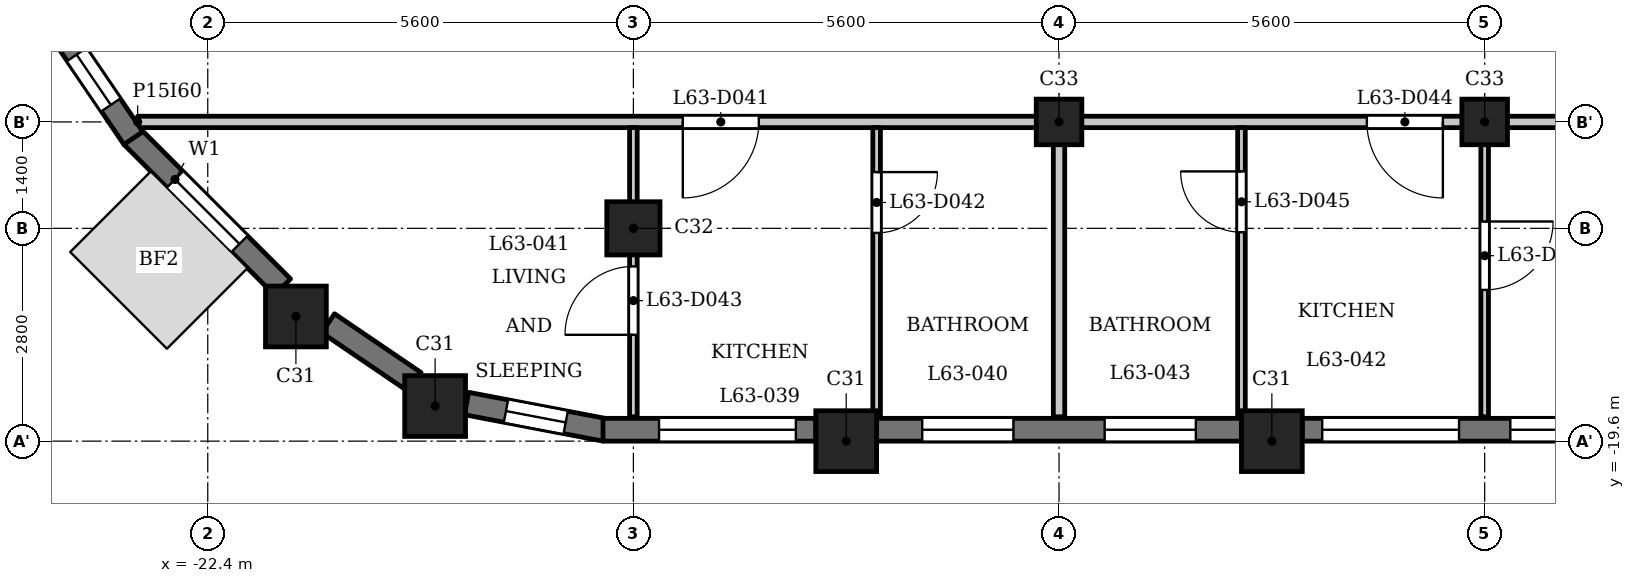
"""IFC4 building model, lengths in metres.
Left out: names, types, materials, properties, quantities, classifications, styles, units other than length and angle.
Written with IfcOpenShell. Run it as: python <this file> out.ifc"""

import sys

from ifc_helpers import new_model, si_unit, direction, frame, frame_2d, origin, origin_2d, place, context, subcontext, project, spatial, rectangle, extrude, element, fill, save


model = new_model("IFC4")
c1 = context("Model", 3, precision=1e-05, world=origin(), true_north=direction((0.0, 1.0)))
c2 = subcontext(c1, "Body", "Model", "MODEL_VIEW")
j1 = project(units=[si_unit("LENGTHUNIT", "METRE"), si_unit("PLANEANGLEUNIT", "RADIAN")], contexts=[c1])
p1 = place(None, origin())
s1 = spatial("IfcSite", under=j1, at=p1, CompositionType="ELEMENT")
p2 = place(p1, origin())
s2 = spatial("IfcBuilding", under=s1, at=p2, CompositionType="ELEMENT")
p3 = place(p2, frame((0.0, 0.0, 245.2)))
s3 = spatial("IfcBuildingStorey", under=s2, at=p3, CompositionType="ELEMENT", Elevation=245.2)
for number, where, z_axis, x_axis in (
    (1, (-19.409, -19.138, 0.0), (0.0, 0.0, 1.0), (1.0, 0.0, 0.0)),
    (2, (-14.0, -19.6, 0.0), (0.0, 0.0, 1.0), (1.0, 0.0, 0.0)),
    (3, (-8.4, -19.6, 0.0), (0.0, 0.0, 1.0), (1.0, 0.0, 0.0)),
    (4, (-21.24, -17.96, 0.0), (0.0, 0.0, 1.0), (1.0, 0.0, 0.0)),
):
    element("IfcColumn", number, at=place(p3, frame(where, z_axis=z_axis, x_axis=x_axis)), inside=s3, PredefinedType="COLUMN", context=c2, shape_type="SweptSolid", body=[
        extrude(rectangle(XDim=0.8, YDim=0.8, at=origin_2d()), origin(), (0.0, 0.0, 1.0), 3.5),
    ])
p4 = place(p3, frame((-16.8, -16.8, 0.0), z_axis=(0.0, 0.0, 1.0), x_axis=(1.0, 0.0, 0.0)))
e5 = element("IfcColumn", 5, at=p4, inside=s3, PredefinedType="COLUMN", context=c2, shape_type="SweptSolid", body=[
    extrude(rectangle(XDim=0.7, YDim=0.7, at=origin_2d()), origin(), (0.0, 0.0, 1.0), 3.5),
])
for number, where, z_axis, x_axis in (
    (6, (-11.2, -15.4, 0.0), (0.0, 0.0, 1.0), (1.0, 0.0, 0.0)),
    (7, (-5.6, -15.4, 0.0), (0.0, 0.0, 1.0), (1.0, 0.0, 0.0)),
):
    element("IfcColumn", number, at=place(p3, frame(where, z_axis=z_axis, x_axis=x_axis)), inside=s3, PredefinedType="COLUMN", context=c2, shape_type="SweptSolid", body=[
        extrude(rectangle(XDim=0.6, YDim=0.6, at=origin_2d()), origin(), (0.0, 0.0, 1.0), 3.5),
    ])
p5 = place(p3, frame((-23.397, -15.591, 0.0), z_axis=(0.0, 0.0, 1.0), x_axis=(0.707150377276, -0.707063182409, 0.0)))
e8 = element("IfcWall", 8, at=p5, inside=s3, PredefinedType="SOLIDWALL", context=c2, shape_type="SweptSolid", body=[
    extrude(rectangle(XDim=2.8, YDim=0.3, at=frame_2d((1.4, 0.0))), origin(), (0.0, 0.0, 1.0), 2.55),
])
p6 = place(p5, frame((0.8, 0.0, 0.6)))
e9 = element("IfcOpeningElement", 9, at=p6, cuts=e8, PredefinedType="OPENING", context=c2, shape_type="SweptSolid", body=[
    extrude(rectangle(XDim=1.2, YDim=1.55, at=frame_2d((0.6, 0.775))), frame((0.0, 0.16, 0.0), z_axis=(0.0, -1.0, 0.0), x_axis=(1.0, 0.0, 0.0)), (0.0, 0.0, 1.0), 0.32),
])
p7 = place(p3, frame((-20.817, -18.048, 0.0), z_axis=(0.0, 0.0, 1.0), x_axis=(0.827025410886, -0.562164539747, 0.0)))
e10 = element("IfcWall", 10, at=p7, inside=s3, PredefinedType="SOLIDWALL", context=c2, shape_type="SweptSolid", body=[
    extrude(rectangle(XDim=1.377, YDim=0.3, at=frame_2d((0.688, 0.0))), origin(), (0.0, 0.0, 1.0), 2.55),
])
p8 = place(p3, frame((-18.995, -19.105, 0.0), z_axis=(0.0, 0.0, 1.0), x_axis=(0.982301706131, -0.187305520826, 0.0)))
e11 = element("IfcWall", 11, at=p8, inside=s3, PredefinedType="SOLIDWALL", context=c2, shape_type="SweptSolid", body=[
    extrude(rectangle(XDim=1.856, YDim=0.3, at=frame_2d((0.928, 0.0))), origin(), (0.0, 0.0, 1.0), 2.55),
])
p9 = place(p8, frame((0.528, 0.0, 0.6)))
e12 = element("IfcOpeningElement", 12, at=p9, cuts=e11, PredefinedType="OPENING", context=c2, shape_type="SweptSolid", body=[
    extrude(rectangle(XDim=0.8, YDim=1.55, at=frame_2d((0.4, 0.775))), frame((0.0, 0.16, 0.0), z_axis=(0.0, -1.0, 0.0), x_axis=(1.0, 0.0, 0.0)), (0.0, 0.0, 1.0), 0.32),
])
p10 = place(p3, frame((-17.2, -19.45, 0.0), z_axis=(0.0, 0.0, 1.0), x_axis=(1.0, 0.0, 0.0)))
e13 = element("IfcWall", 13, at=p10, inside=s3, PredefinedType="SOLIDWALL", context=c2, shape_type="SweptSolid", body=[
    extrude(rectangle(XDim=2.8, YDim=0.3, at=frame_2d((1.4, 0.0))), origin(), (0.0, 0.0, 1.0), 2.55),
])
p11 = place(p10, frame((0.738, 0.0, 0.9)))
e14 = element("IfcOpeningElement", 14, at=p11, cuts=e13, PredefinedType="OPENING", context=c2, shape_type="SweptSolid", body=[
    extrude(rectangle(XDim=1.8, YDim=1.25, at=frame_2d((0.9, 0.625))), frame((0.0, 0.16, 0.0), z_axis=(0.0, -1.0, 0.0), x_axis=(1.0, 0.0, 0.0)), (0.0, 0.0, 1.0), 0.32),
])
p12 = place(p3, frame((-13.6, -19.45, 0.0), z_axis=(0.0, 0.0, 1.0), x_axis=(1.0, 0.0, 0.0)))
e15 = element("IfcWall", 15, at=p12, inside=s3, PredefinedType="SOLIDWALL", context=c2, shape_type="SweptSolid", body=[
    extrude(rectangle(XDim=4.8, YDim=0.3, at=frame_2d((2.4, 0.0))), origin(), (0.0, 0.0, 1.0), 2.55),
])
p13 = place(p12, frame((0.6, 0.0, 0.6)))
e16 = element("IfcOpeningElement", 16, at=p13, cuts=e15, PredefinedType="OPENING", context=c2, shape_type="SweptSolid", body=[
    extrude(rectangle(XDim=1.2, YDim=1.55, at=frame_2d((0.6, 0.775))), frame((0.0, 0.16, 0.0), z_axis=(0.0, -1.0, 0.0), x_axis=(1.0, 0.0, 0.0)), (0.0, 0.0, 1.0), 0.32),
])
p14 = place(p12, frame((3.0, 0.0, 0.6)))
e17 = element("IfcOpeningElement", 17, at=p14, cuts=e15, PredefinedType="OPENING", context=c2, shape_type="SweptSolid", body=[
    extrude(rectangle(XDim=1.2, YDim=1.55, at=frame_2d((0.6, 0.775))), frame((0.0, 0.16, 0.0), z_axis=(0.0, -1.0, 0.0), x_axis=(1.0, 0.0, 0.0)), (0.0, 0.0, 1.0), 0.32),
])
p15 = place(p3, frame((-8.0, -19.45, 0.0), z_axis=(0.0, 0.0, 1.0), x_axis=(1.0, 0.0, 0.0)))
e18 = element("IfcWall", 18, at=p15, inside=s3, PredefinedType="SOLIDWALL", context=c2, shape_type="SweptSolid", body=[
    extrude(rectangle(XDim=4.8, YDim=0.3, at=frame_2d((2.4, 0.0))), origin(), (0.0, 0.0, 1.0), 2.55),
])
p16 = place(p15, frame((0.262, 0.0, 0.9)))
e19 = element("IfcOpeningElement", 19, at=p16, cuts=e18, PredefinedType="OPENING", context=c2, shape_type="SweptSolid", body=[
    extrude(rectangle(XDim=1.8, YDim=1.25, at=frame_2d((0.9, 0.625))), frame((0.0, 0.16, 0.0), z_axis=(0.0, -1.0, 0.0), x_axis=(1.0, 0.0, 0.0)), (0.0, 0.0, 1.0), 0.32),
])
p17 = place(p15, frame((2.738, 0.0, 0.9)))
e20 = element("IfcOpeningElement", 20, at=p17, cuts=e18, PredefinedType="OPENING", context=c2, shape_type="SweptSolid", body=[
    extrude(rectangle(XDim=1.8, YDim=1.25, at=frame_2d((0.9, 0.625))), frame((0.0, 0.16, 0.0), z_axis=(0.0, -1.0, 0.0), x_axis=(1.0, 0.0, 0.0)), (0.0, 0.0, 1.0), 0.32),
])
p18 = place(p3, frame((-24.422, -14.078, 0.0), z_axis=(0.0, 0.0, 1.0), x_axis=(0.562054549384, -0.827100165347, 0.0)))
e21 = element("IfcWall", 21, at=p18, inside=s3, PredefinedType="SOLIDWALL", context=c2, shape_type="SweptSolid", body=[
    extrude(rectangle(XDim=1.856, YDim=0.3, at=frame_2d((0.928, 0.0))), origin(), (0.0, 0.0, 1.0), 2.55),
])
p19 = place(p18, frame((0.528, 0.0, 0.6)))
e22 = element("IfcOpeningElement", 22, at=p19, cuts=e21, PredefinedType="OPENING", context=c2, shape_type="SweptSolid", body=[
    extrude(rectangle(XDim=0.8, YDim=1.55, at=frame_2d((0.4, 0.775))), frame((0.0, 0.16, 0.0), z_axis=(0.0, -1.0, 0.0), x_axis=(1.0, 0.0, 0.0)), (0.0, 0.0, 1.0), 0.32),
])
p20 = place(p3, frame((-23.322, -15.4, 0.0), z_axis=(0.0, 0.0, 1.0), x_axis=(1.0, 0.0, 0.0)))
e23 = element("IfcWall", 23, at=p20, inside=s3, PredefinedType="PARTITIONING", context=c2, shape_type="SweptSolid", body=[
    extrude(rectangle(XDim=46.872, YDim=0.15, at=frame_2d((23.436, 0.0))), origin(), (0.0, 0.0, 1.0), 3.2),
])
p21 = place(p20, frame((7.172, 0.0, 0.0)))
e24 = element("IfcOpeningElement", 24, at=p21, cuts=e23, PredefinedType="OPENING", context=c2, shape_type="SweptSolid", body=[
    extrude(rectangle(XDim=1.0, YDim=2.1, at=frame_2d((0.5, 1.05))), frame((0.0, 0.085, 0.0), z_axis=(0.0, -1.0, 0.0), x_axis=(1.0, 0.0, 0.0)), (0.0, 0.0, 1.0), 0.17),
])
p22 = place(p20, frame((16.172, 0.0, 0.0)))
e25 = element("IfcOpeningElement", 25, at=p22, cuts=e23, PredefinedType="OPENING", context=c2, shape_type="SweptSolid", body=[
    extrude(rectangle(XDim=1.0, YDim=2.1, at=frame_2d((0.5, 1.05))), frame((0.0, 0.085, 0.0), z_axis=(0.0, -1.0, 0.0), x_axis=(1.0, 0.0, 0.0)), (0.0, 0.0, 1.0), 0.17),
])
p23 = place(p20, frame((26.372, 0.0, 0.0)))
e26 = element("IfcOpeningElement", 26, at=p23, cuts=e23, PredefinedType="OPENING", context=c2, shape_type="SweptSolid", body=[
    extrude(rectangle(XDim=1.0, YDim=2.1, at=frame_2d((0.5, 1.05))), frame((0.0, 0.085, 0.0), z_axis=(0.0, -1.0, 0.0), x_axis=(1.0, 0.0, 0.0)), (0.0, 0.0, 1.0), 0.17),
])
p24 = place(p20, frame((38.572, 0.0, 0.0)))
e27 = element("IfcOpeningElement", 27, at=p24, cuts=e23, PredefinedType="OPENING", context=c2, shape_type="SweptSolid", body=[
    extrude(rectangle(XDim=1.0, YDim=2.1, at=frame_2d((0.5, 1.05))), frame((0.0, 0.085, 0.0), z_axis=(0.0, -1.0, 0.0), x_axis=(1.0, 0.0, 0.0)), (0.0, 0.0, 1.0), 0.17),
])
p25 = place(p3, frame((-16.8, -19.28, 0.0), z_axis=(0.0, 0.0, 1.0), x_axis=(0.0, 1.0, 0.0)))
e28 = element("IfcWall", 28, at=p25, inside=s3, PredefinedType="PARTITIONING", context=c2, shape_type="SweptSolid", body=[
    extrude(rectangle(XDim=3.805, YDim=0.1, at=frame_2d((1.902, 0.0))), origin(), (0.0, 0.0, 1.0), 3.2),
])
p26 = place(p25, frame((1.079, 0.0, 0.0)))
e29 = element("IfcOpeningElement", 29, at=p26, cuts=e28, PredefinedType="OPENING", context=c2, shape_type="SweptSolid", body=[
    extrude(rectangle(XDim=0.9, YDim=2.1, at=frame_2d((0.45, 1.05))), frame((0.0, 0.06, 0.0), z_axis=(0.0, -1.0, 0.0), x_axis=(1.0, 0.0, 0.0)), (0.0, 0.0, 1.0), 0.12),
])
p27 = place(p3, frame((-13.6, -19.28, 0.0), z_axis=(0.0, 0.0, 1.0), x_axis=(0.0, 1.0, 0.0)))
e30 = element("IfcWall", 30, at=p27, inside=s3, PredefinedType="PARTITIONING", context=c2, shape_type="SweptSolid", body=[
    extrude(rectangle(XDim=3.805, YDim=0.1, at=frame_2d((1.902, 0.0))), origin(), (0.0, 0.0, 1.0), 3.2),
])
p28 = place(p27, frame((2.42, 0.0, 0.0)))
e31 = element("IfcOpeningElement", 31, at=p28, cuts=e30, PredefinedType="OPENING", context=c2, shape_type="SweptSolid", body=[
    extrude(rectangle(XDim=0.8, YDim=2.1, at=frame_2d((0.4, 1.05))), frame((0.0, 0.06, 0.0), z_axis=(0.0, -1.0, 0.0), x_axis=(1.0, 0.0, 0.0)), (0.0, 0.0, 1.0), 0.12),
])
p29 = place(p3, frame((-11.2, -19.28, 0.0), z_axis=(0.0, 0.0, 1.0), x_axis=(0.0, 1.0, 0.0)))
e32 = element("IfcWall", 32, at=p29, inside=s3, PredefinedType="PARTITIONING", context=c2, shape_type="SweptSolid", body=[
    extrude(rectangle(XDim=3.805, YDim=0.15, at=frame_2d((1.902, 0.0))), origin(), (0.0, 0.0, 1.0), 3.2),
])
p30 = place(p3, frame((-8.8, -19.28, 0.0), z_axis=(0.0, 0.0, 1.0), x_axis=(0.0, 1.0, 0.0)))
e33 = element("IfcWall", 33, at=p30, inside=s3, PredefinedType="PARTITIONING", context=c2, shape_type="SweptSolid", body=[
    extrude(rectangle(XDim=3.805, YDim=0.1, at=frame_2d((1.902, 0.0))), origin(), (0.0, 0.0, 1.0), 3.2),
])
p31 = place(p30, frame((2.429, 0.0, 0.0)))
e34 = element("IfcOpeningElement", 34, at=p31, cuts=e33, PredefinedType="OPENING", context=c2, shape_type="SweptSolid", body=[
    extrude(rectangle(XDim=0.8, YDim=2.1, at=frame_2d((0.4, 1.05))), frame((0.0, 0.06, 0.0), z_axis=(0.0, -1.0, 0.0), x_axis=(1.0, 0.0, 0.0)), (0.0, 0.0, 1.0), 0.12),
])
p32 = place(p3, frame((-5.6, -19.28, 0.0), z_axis=(0.0, 0.0, 1.0), x_axis=(0.0, 1.0, 0.0)))
e35 = element("IfcWall", 35, at=p32, inside=s3, PredefinedType="PARTITIONING", context=c2, shape_type="SweptSolid", body=[
    extrude(rectangle(XDim=3.805, YDim=0.1, at=frame_2d((1.902, 0.0))), origin(), (0.0, 0.0, 1.0), 3.2),
])
p33 = place(p32, frame((1.67, 0.0, 0.0)))
e36 = element("IfcOpeningElement", 36, at=p33, cuts=e35, PredefinedType="OPENING", context=c2, shape_type="SweptSolid", body=[
    extrude(rectangle(XDim=0.9, YDim=2.1, at=frame_2d((0.45, 1.05))), frame((0.0, 0.06, 0.0), z_axis=(0.0, -1.0, 0.0), x_axis=(1.0, 0.0, 0.0)), (0.0, 0.0, 1.0), 0.12),
])
p34 = place(p21, origin())
e37 = element("IfcDoor", 37, at=p34, inside=s3, OperationType="SINGLE_SWING_LEFT", PredefinedType="DOOR", context=c2, shape_type="SweptSolid", body=[
    extrude(rectangle(XDim=1.0, YDim=2.1, at=frame_2d((0.5, 1.05))), frame((0.0, 0.025, 0.0), z_axis=(0.0, -1.0, 0.0), x_axis=(1.0, 0.0, 0.0)), (0.0, 0.0, 1.0), 0.05),
])
fill(e24, e37)
p35 = place(p28, origin())
e38 = element("IfcDoor", 38, at=p35, inside=s3, OperationType="SINGLE_SWING_RIGHT", PredefinedType="DOOR", context=c2, shape_type="SweptSolid", body=[
    extrude(rectangle(XDim=0.8, YDim=2.1, at=frame_2d((0.4, 1.05))), frame((0.0, 0.025, 0.0), z_axis=(0.0, -1.0, 0.0), x_axis=(1.0, 0.0, 0.0)), (0.0, 0.0, 1.0), 0.05),
])
fill(e31, e38)
p36 = place(p26, origin())
e39 = element("IfcDoor", 39, at=p36, inside=s3, OperationType="SINGLE_SWING_RIGHT", PredefinedType="DOOR", context=c2, shape_type="SweptSolid", body=[
    extrude(rectangle(XDim=0.9, YDim=2.1, at=frame_2d((0.45, 1.05))), frame((0.0, 0.025, 0.0), z_axis=(0.0, -1.0, 0.0), x_axis=(1.0, 0.0, 0.0)), (0.0, 0.0, 1.0), 0.05),
])
fill(e29, e39)
p37 = place(p22, origin())
e40 = element("IfcDoor", 40, at=p37, inside=s3, OperationType="SINGLE_SWING_RIGHT", PredefinedType="DOOR", context=c2, shape_type="SweptSolid", body=[
    extrude(rectangle(XDim=1.0, YDim=2.1, at=frame_2d((0.5, 1.05))), frame((0.0, 0.025, 0.0), z_axis=(0.0, -1.0, 0.0), x_axis=(1.0, 0.0, 0.0)), (0.0, 0.0, 1.0), 0.05),
])
fill(e25, e40)
p38 = place(p31, origin())
e41 = element("IfcDoor", 41, at=p38, inside=s3, OperationType="SINGLE_SWING_LEFT", PredefinedType="DOOR", context=c2, shape_type="SweptSolid", body=[
    extrude(rectangle(XDim=0.8, YDim=2.1, at=frame_2d((0.4, 1.05))), frame((0.0, 0.025, 0.0), z_axis=(0.0, -1.0, 0.0), x_axis=(1.0, 0.0, 0.0)), (0.0, 0.0, 1.0), 0.05),
])
fill(e34, e41)
p39 = place(p33, origin())
e42 = element("IfcDoor", 42, at=p39, inside=s3, OperationType="SINGLE_SWING_RIGHT", PredefinedType="DOOR", context=c2, shape_type="SweptSolid", body=[
    extrude(rectangle(XDim=0.9, YDim=2.1, at=frame_2d((0.45, 1.05))), frame((0.0, 0.025, 0.0), z_axis=(0.0, -1.0, 0.0), x_axis=(1.0, 0.0, 0.0)), (0.0, 0.0, 1.0), 0.05),
])
fill(e36, e42)
p40 = place(p6, origin())
e43 = element("IfcWindow", 43, at=p40, inside=s3, PartitioningType="SINGLE_PANEL", PredefinedType="WINDOW", context=c2, shape_type="SweptSolid", body=[
    extrude(rectangle(XDim=1.2, YDim=1.55, at=frame_2d((0.6, 0.775))), frame((0.0, 0.03, 0.0), z_axis=(0.0, -1.0, 0.0), x_axis=(1.0, 0.0, 0.0)), (0.0, 0.0, 1.0), 0.06),
])
fill(e9, e43)
p41 = place(p9, origin())
e44 = element("IfcWindow", 44, at=p41, inside=s3, PartitioningType="SINGLE_PANEL", PredefinedType="WINDOW", context=c2, shape_type="SweptSolid", body=[
    extrude(rectangle(XDim=0.8, YDim=1.55, at=frame_2d((0.4, 0.775))), frame((0.0, 0.03, 0.0), z_axis=(0.0, -1.0, 0.0), x_axis=(1.0, 0.0, 0.0)), (0.0, 0.0, 1.0), 0.06),
])
fill(e12, e44)
p42 = place(p11, origin())
e45 = element("IfcWindow", 45, at=p42, inside=s3, PartitioningType="SINGLE_PANEL", PredefinedType="WINDOW", context=c2, shape_type="SweptSolid", body=[
    extrude(rectangle(XDim=1.8, YDim=1.25, at=frame_2d((0.9, 0.625))), frame((0.0, 0.03, 0.0), z_axis=(0.0, -1.0, 0.0), x_axis=(1.0, 0.0, 0.0)), (0.0, 0.0, 1.0), 0.06),
])
fill(e14, e45)
p43 = place(p13, origin())
e46 = element("IfcWindow", 46, at=p43, inside=s3, PartitioningType="SINGLE_PANEL", PredefinedType="WINDOW", context=c2, shape_type="SweptSolid", body=[
    extrude(rectangle(XDim=1.2, YDim=1.55, at=frame_2d((0.6, 0.775))), frame((0.0, 0.03, 0.0), z_axis=(0.0, -1.0, 0.0), x_axis=(1.0, 0.0, 0.0)), (0.0, 0.0, 1.0), 0.06),
])
fill(e16, e46)
p44 = place(p14, origin())
e47 = element("IfcWindow", 47, at=p44, inside=s3, PartitioningType="SINGLE_PANEL", PredefinedType="WINDOW", context=c2, shape_type="SweptSolid", body=[
    extrude(rectangle(XDim=1.2, YDim=1.55, at=frame_2d((0.6, 0.775))), frame((0.0, 0.03, 0.0), z_axis=(0.0, -1.0, 0.0), x_axis=(1.0, 0.0, 0.0)), (0.0, 0.0, 1.0), 0.06),
])
fill(e17, e47)
p45 = place(p16, origin())
e48 = element("IfcWindow", 48, at=p45, inside=s3, PartitioningType="SINGLE_PANEL", PredefinedType="WINDOW", context=c2, shape_type="SweptSolid", body=[
    extrude(rectangle(XDim=1.8, YDim=1.25, at=frame_2d((0.9, 0.625))), frame((0.0, 0.03, 0.0), z_axis=(0.0, -1.0, 0.0), x_axis=(1.0, 0.0, 0.0)), (0.0, 0.0, 1.0), 0.06),
])
fill(e19, e48)
p46 = place(p17, origin())
e49 = element("IfcWindow", 49, at=p46, inside=s3, PartitioningType="SINGLE_PANEL", PredefinedType="WINDOW", context=c2, shape_type="SweptSolid", body=[
    extrude(rectangle(XDim=1.8, YDim=1.25, at=frame_2d((0.9, 0.625))), frame((0.0, 0.03, 0.0), z_axis=(0.0, -1.0, 0.0), x_axis=(1.0, 0.0, 0.0)), (0.0, 0.0, 1.0), 0.06),
])
fill(e20, e49)
p47 = place(p19, origin())
e50 = element("IfcWindow", 50, at=p47, inside=s3, PartitioningType="SINGLE_PANEL", PredefinedType="WINDOW", context=c2, shape_type="SweptSolid", body=[
    extrude(rectangle(XDim=0.8, YDim=1.55, at=frame_2d((0.4, 0.775))), frame((0.0, 0.03, 0.0), z_axis=(0.0, -1.0, 0.0), x_axis=(1.0, 0.0, 0.0)), (0.0, 0.0, 1.0), 0.06),
])
fill(e22, e50)
save(model, sys.argv[1])
